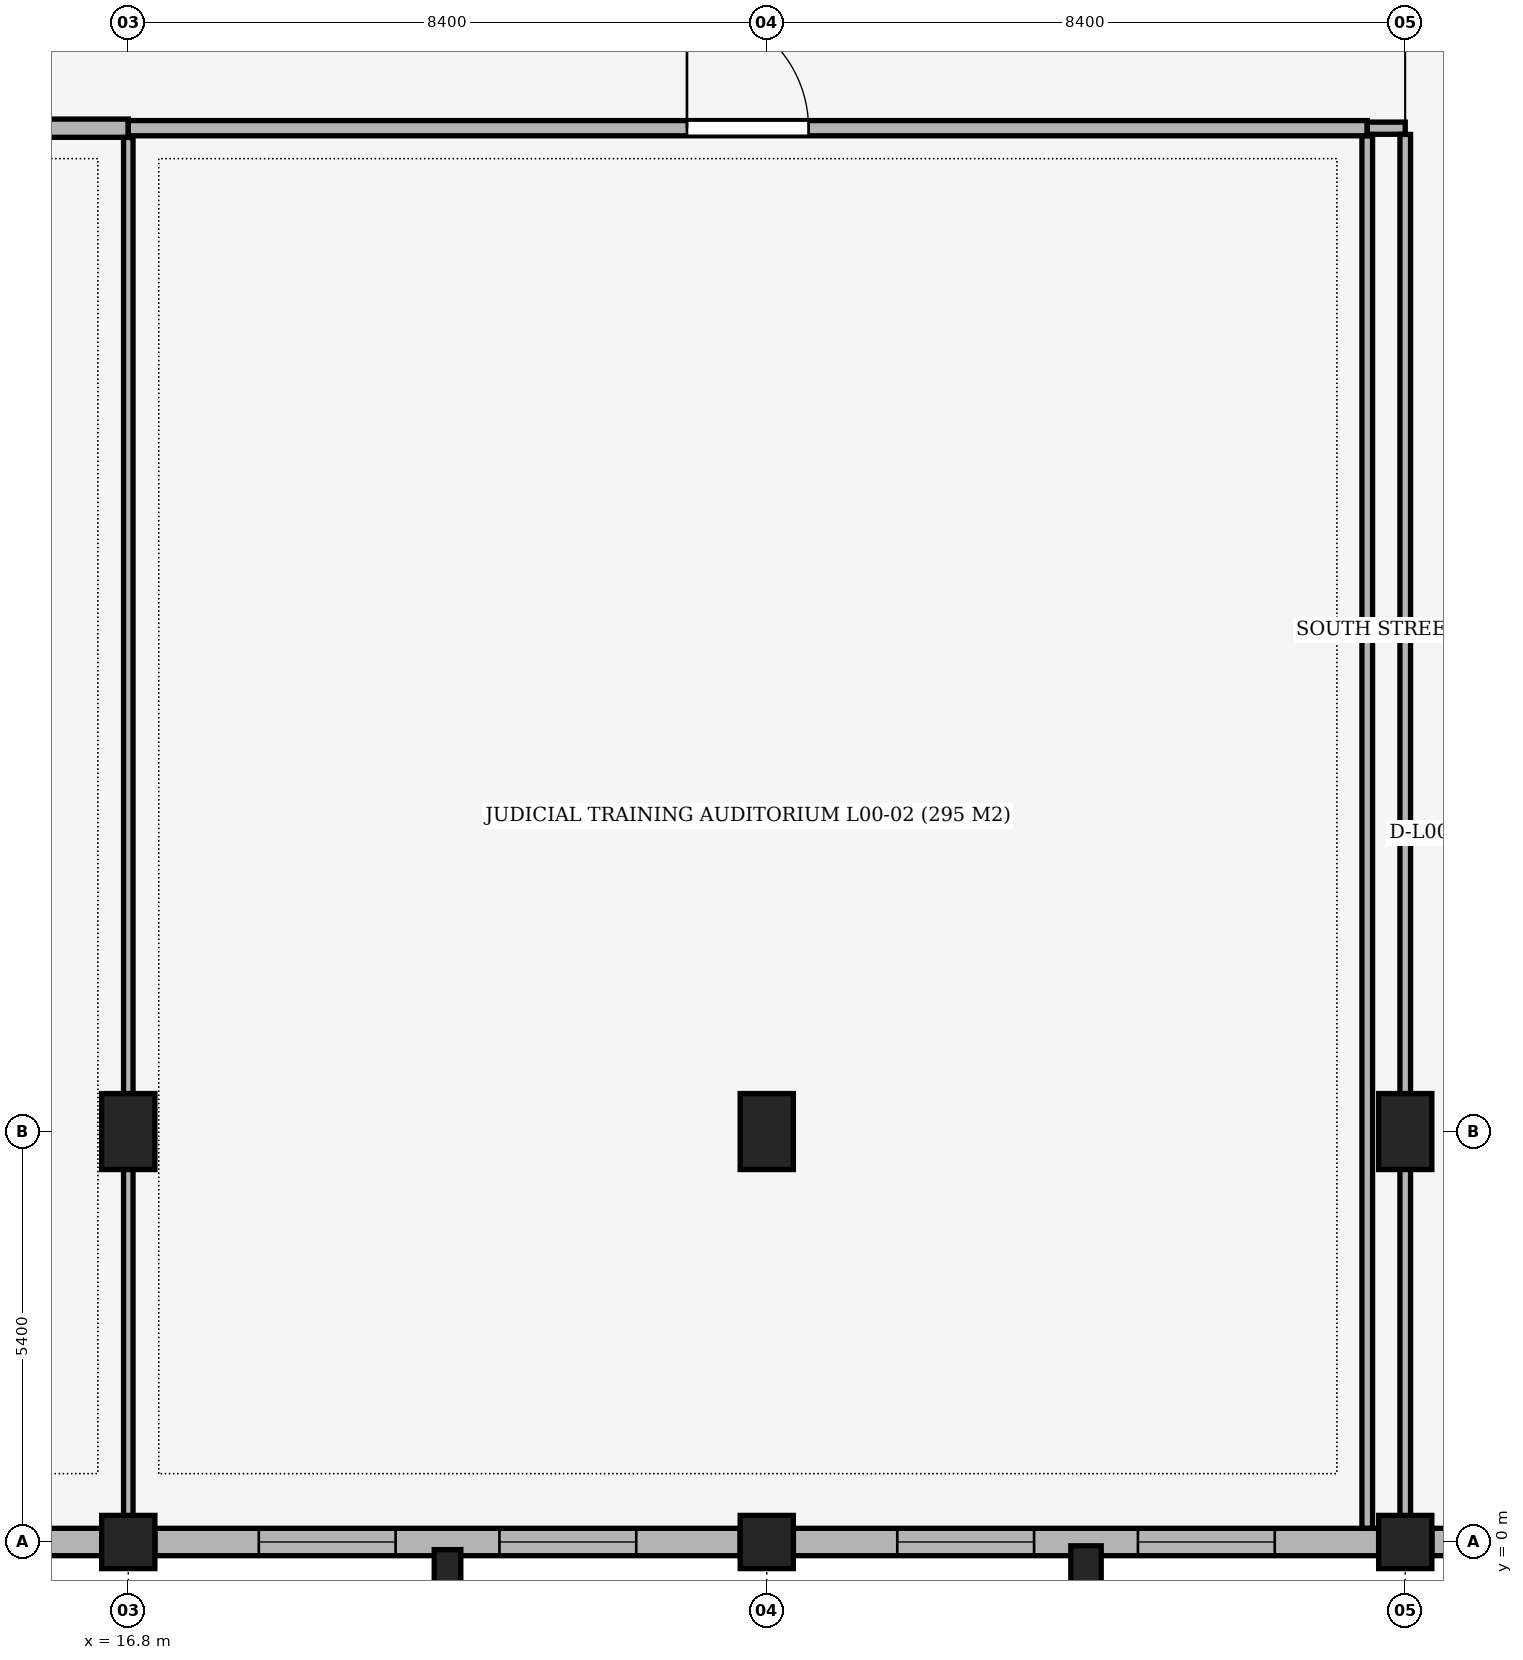
"""IFC4 building model, lengths in metres.
Left out: names, types, materials, properties, quantities, classifications, styles, units other than length and angle.
Written with IfcOpenShell. Run it as: python <this file> out.ifc"""

import sys

from ifc_helpers import new_model, si_unit, direction, frame, frame_2d, origin, origin_2d, place, context, subcontext, project, spatial, rectangle, extrude, element, fill, save


model = new_model("IFC4")
c1 = context("Model", 3, precision=1e-05, world=origin(), true_north=direction((0.0, 1.0)))
c2 = subcontext(c1, "Body", "Model", "MODEL_VIEW")
j1 = project(units=[si_unit("LENGTHUNIT", "METRE"), si_unit("PLANEANGLEUNIT", "RADIAN")], contexts=[c1])
p1 = place(None, origin())
s1 = spatial("IfcSite", under=j1, at=p1, CompositionType="ELEMENT")
p2 = place(p1, origin())
s2 = spatial("IfcBuilding", under=s1, at=p2, CompositionType="ELEMENT")
p3 = place(p2, origin())
s3 = spatial("IfcBuildingStorey", under=s2, at=p3, CompositionType="ELEMENT", Elevation=0.0)
p4 = place(p3, frame((16.8, 0.0, 0.0), z_axis=(0.0, 0.0, 1.0), x_axis=(1.0, 0.0, 0.0)))
e1 = element("IfcColumn", 1, at=p4, inside=s3, PredefinedType="COLUMN", context=c2, shape_type="SweptSolid", body=[
    extrude(rectangle(XDim=0.7, YDim=0.7, at=origin_2d()), origin(), (0.0, 0.0, 1.0), 5.1),
])
p5 = place(p3, frame((16.8, 5.4, 0.0), z_axis=(0.0, 0.0, 1.0), x_axis=(1.0, 0.0, 0.0)))
e2 = element("IfcColumn", 2, at=p5, inside=s3, PredefinedType="COLUMN", context=c2, shape_type="SweptSolid", body=[
    extrude(rectangle(XDim=0.7, YDim=1.0, at=origin_2d()), origin(), (0.0, 0.0, 1.0), 5.1),
])
p6 = place(p3, frame((25.2, 0.0, 0.0), z_axis=(0.0, 0.0, 1.0), x_axis=(1.0, 0.0, 0.0)))
e3 = element("IfcColumn", 3, at=p6, inside=s3, PredefinedType="COLUMN", context=c2, shape_type="SweptSolid", body=[
    extrude(rectangle(XDim=0.7, YDim=0.7, at=origin_2d()), origin(), (0.0, 0.0, 1.0), 5.1),
])
p7 = place(p3, frame((25.2, 5.4, 0.0), z_axis=(0.0, 0.0, 1.0), x_axis=(1.0, 0.0, 0.0)))
e4 = element("IfcColumn", 4, at=p7, inside=s3, PredefinedType="COLUMN", context=c2, shape_type="SweptSolid", body=[
    extrude(rectangle(XDim=0.7, YDim=1.0, at=origin_2d()), origin(), (0.0, 0.0, 1.0), 5.1),
])
p8 = place(p3, frame((33.6, 0.0, 0.0), z_axis=(0.0, 0.0, 1.0), x_axis=(1.0, 0.0, 0.0)))
e5 = element("IfcColumn", 5, at=p8, inside=s3, PredefinedType="COLUMN", context=c2, shape_type="SweptSolid", body=[
    extrude(rectangle(XDim=0.7, YDim=0.7, at=origin_2d()), origin(), (0.0, 0.0, 1.0), 5.1),
])
p9 = place(p3, frame((33.6, 5.4, 0.0), z_axis=(0.0, 0.0, 1.0), x_axis=(1.0, 0.0, 0.0)))
e6 = element("IfcColumn", 6, at=p9, inside=s3, PredefinedType="COLUMN", context=c2, shape_type="SweptSolid", body=[
    extrude(rectangle(XDim=0.7, YDim=1.0, at=origin_2d()), origin(), (0.0, 0.0, 1.0), 5.1),
])
p10 = place(p3, frame((21.0, -0.35, 0.0), z_axis=(0.0, 0.0, 1.0), x_axis=(1.0, 0.0, 0.0)))
e7 = element("IfcColumn", 7, at=p10, inside=s3, PredefinedType="PILASTER", context=c2, shape_type="SweptSolid", body=[
    extrude(rectangle(XDim=0.35, YDim=0.5, at=origin_2d()), origin(), (0.0, 0.0, 1.0), 5.1),
])
p11 = place(p3, frame((29.4, -0.35, 0.0), z_axis=(0.0, 0.0, 1.0), x_axis=(1.0, 0.0, 0.0)))
e8 = element("IfcColumn", 8, at=p11, inside=s3, PredefinedType="PILASTER", context=c2, shape_type="SweptSolid", body=[
    extrude(rectangle(XDim=0.4, YDim=0.6, at=origin_2d()), origin(), (0.0, 0.0, 1.0), 5.1),
])
p12 = place(p3, frame((41.65, 0.0, 0.0), z_axis=(0.0, 0.0, 1.0), x_axis=(-1.0, 0.0, 0.0)))
e9 = element("IfcWall", 9, at=p12, inside=s3, PredefinedType="SOLIDWALL", context=c2, shape_type="SweptSolid", body=[
    extrude(rectangle(XDim=7.7, YDim=0.36, at=frame_2d((3.85, 0.0))), origin(), (0.0, 0.0, 1.0), 4.07),
])
p13 = place(p12, frame((5.45, 0.0, 0.0)))
e10 = element("IfcOpeningElement", 10, at=p13, cuts=e9, PredefinedType="OPENING", context=c2, shape_type="SweptSolid", body=[
    extrude(rectangle(XDim=1.8, YDim=2.2, at=frame_2d((0.9, 1.1))), frame((0.0, 0.195, 0.0), z_axis=(0.0, -1.0, 0.0), x_axis=(1.0, 0.0, 0.0)), (0.0, 0.0, 1.0), 0.39),
])
p14 = place(p3, frame((33.25, 0.0, 0.0), z_axis=(0.0, 0.0, 1.0), x_axis=(-1.0, 0.0, 0.0)))
e11 = element("IfcWall", 11, at=p14, inside=s3, PredefinedType="SOLIDWALL", context=c2, shape_type="SweptSolid", body=[
    extrude(rectangle(XDim=7.7, YDim=0.36, at=frame_2d((3.85, 0.0))), origin(), (0.0, 0.0, 1.0), 4.07),
])
p15 = place(p14, frame((1.367, 0.0, 0.85)))
e12 = element("IfcOpeningElement", 12, at=p15, cuts=e11, PredefinedType="OPENING", context=c2, shape_type="SweptSolid", body=[
    extrude(rectangle(XDim=1.8, YDim=2.4, at=frame_2d((0.9, 1.2))), frame((0.0, 0.195, 0.0), z_axis=(0.0, -1.0, 0.0), x_axis=(1.0, 0.0, 0.0)), (0.0, 0.0, 1.0), 0.39),
])
p16 = place(p14, frame((4.533, 0.0, 0.85)))
e13 = element("IfcOpeningElement", 13, at=p16, cuts=e11, PredefinedType="OPENING", context=c2, shape_type="SweptSolid", body=[
    extrude(rectangle(XDim=1.8, YDim=2.4, at=frame_2d((0.9, 1.2))), frame((0.0, 0.195, 0.0), z_axis=(0.0, -1.0, 0.0), x_axis=(1.0, 0.0, 0.0)), (0.0, 0.0, 1.0), 0.39),
])
p17 = place(p3, frame((24.85, 0.0, 0.0), z_axis=(0.0, 0.0, 1.0), x_axis=(-1.0, 0.0, 0.0)))
e14 = element("IfcWall", 14, at=p17, inside=s3, PredefinedType="SOLIDWALL", context=c2, shape_type="SweptSolid", body=[
    extrude(rectangle(XDim=7.7, YDim=0.36, at=frame_2d((3.85, 0.0))), origin(), (0.0, 0.0, 1.0), 4.07),
])
p18 = place(p17, frame((1.367, 0.0, 0.85)))
e15 = element("IfcOpeningElement", 15, at=p18, cuts=e14, PredefinedType="OPENING", context=c2, shape_type="SweptSolid", body=[
    extrude(rectangle(XDim=1.8, YDim=2.4, at=frame_2d((0.9, 1.2))), frame((0.0, 0.195, 0.0), z_axis=(0.0, -1.0, 0.0), x_axis=(1.0, 0.0, 0.0)), (0.0, 0.0, 1.0), 0.39),
])
p19 = place(p17, frame((4.533, 0.0, 0.85)))
e16 = element("IfcOpeningElement", 16, at=p19, cuts=e14, PredefinedType="OPENING", context=c2, shape_type="SweptSolid", body=[
    extrude(rectangle(XDim=1.8, YDim=2.4, at=frame_2d((0.9, 1.2))), frame((0.0, 0.195, 0.0), z_axis=(0.0, -1.0, 0.0), x_axis=(1.0, 0.0, 0.0)), (0.0, 0.0, 1.0), 0.39),
])
p20 = place(p3, frame((16.45, 0.0, 0.0), z_axis=(0.0, 0.0, 1.0), x_axis=(-1.0, 0.0, 0.0)))
e17 = element("IfcWall", 17, at=p20, inside=s3, PredefinedType="SOLIDWALL", context=c2, shape_type="SweptSolid", body=[
    extrude(rectangle(XDim=7.7, YDim=0.36, at=frame_2d((3.85, 0.0))), origin(), (0.0, 0.0, 1.0), 4.07),
])
p21 = place(p20, frame((3.25, 0.0, 0.0)))
e18 = element("IfcOpeningElement", 18, at=p21, cuts=e17, PredefinedType="OPENING", context=c2, shape_type="SweptSolid", body=[
    extrude(rectangle(XDim=1.2, YDim=2.2, at=frame_2d((0.6, 1.1))), frame((0.0, 0.195, 0.0), z_axis=(0.0, -1.0, 0.0), x_axis=(1.0, 0.0, 0.0)), (0.0, 0.0, 1.0), 0.39),
])
p22 = place(p3, frame((0.182, 18.6, 0.0), z_axis=(0.0, 0.0, 1.0), x_axis=(1.0, 0.0, 0.0)))
e19 = element("IfcWall", 19, at=p22, inside=s3, PredefinedType="PARTITIONING", context=c2, shape_type="SweptSolid", body=[
    extrude(rectangle(XDim=16.618, YDim=0.24, at=frame_2d((8.309, 0.0))), origin(), (0.0, 0.0, 1.0), 3.67),
])
p23 = place(p22, frame((7.509, 0.0, 0.0)))
e20 = element("IfcOpeningElement", 20, at=p23, cuts=e19, PredefinedType="OPENING", context=c2, shape_type="SweptSolid", body=[
    extrude(rectangle(XDim=1.6, YDim=2.3, at=frame_2d((0.8, 1.15))), frame((0.0, 0.135, 0.0), z_axis=(0.0, -1.0, 0.0), x_axis=(1.0, 0.0, 0.0)), (0.0, 0.0, 1.0), 0.27),
])
p24 = place(p3, frame((16.8, 18.6, 0.0), z_axis=(0.0, 0.0, 1.0), x_axis=(1.0, 0.0, 0.0)))
e21 = element("IfcWall", 21, at=p24, inside=s3, PredefinedType="PARTITIONING", context=c2, shape_type="SweptSolid", body=[
    extrude(rectangle(XDim=16.3, YDim=0.2, at=frame_2d((8.15, 0.0))), origin(), (0.0, 0.0, 1.0), 3.67),
])
p25 = place(p24, frame((7.35, 0.0, 0.0)))
e22 = element("IfcOpeningElement", 22, at=p25, cuts=e21, PredefinedType="OPENING", context=c2, shape_type="SweptSolid", body=[
    extrude(rectangle(XDim=1.6, YDim=2.3, at=frame_2d((0.8, 1.15))), frame((0.0, 0.115, 0.0), z_axis=(0.0, -1.0, 0.0), x_axis=(1.0, 0.0, 0.0)), (0.0, 0.0, 1.0), 0.23),
])
p26 = place(p3, frame((33.1, 18.6, 0.0), z_axis=(0.0, 0.0, 1.0), x_axis=(1.0, 0.0, 0.0)))
e23 = element("IfcWall", 23, at=p26, inside=s3, PredefinedType="PARTITIONING", context=c2, shape_type="SweptSolid", body=[
    extrude(rectangle(XDim=0.5, YDim=0.16, at=frame_2d((0.25, 0.0))), origin(), (0.0, 0.0, 1.0), 3.67),
])
p27 = place(p3, frame((16.8, 0.065, 0.0), z_axis=(0.0, 0.0, 1.0), x_axis=(0.0, 1.0, 0.0)))
e24 = element("IfcWall", 24, at=p27, inside=s3, PredefinedType="PARTITIONING", context=c2, shape_type="SweptSolid", body=[
    extrude(rectangle(XDim=18.413, YDim=0.125, at=frame_2d((9.207, 0.0))), origin(), (0.0, 0.0, 1.0), 3.67),
])
p28 = place(p3, frame((33.1, 0.182, 0.0), z_axis=(0.0, 0.0, 1.0), x_axis=(0.0, 1.0, 0.0)))
e25 = element("IfcWall", 25, at=p28, inside=s3, PredefinedType="PARTITIONING", context=c2, shape_type="SweptSolid", body=[
    extrude(rectangle(XDim=18.316, YDim=0.14, at=frame_2d((9.158, 0.0))), origin(), (0.0, 0.0, 1.0), 4.07),
])
p29 = place(p3, frame((33.6, -0.028, 0.0), z_axis=(0.0, 0.0, 1.0), x_axis=(0.0, 1.0, 0.0)))
e26 = element("IfcWall", 26, at=p29, inside=s3, PredefinedType="PARTITIONING", context=c2, shape_type="SweptSolid", body=[
    extrude(rectangle(XDim=18.546, YDim=0.14, at=frame_2d((9.273, 0.0))), origin(), (0.0, 0.0, 1.0), 3.67),
])
p30 = place(p15, origin())
e27 = element("IfcWindow", 27, at=p30, inside=s3, PartitioningType="SINGLE_PANEL", PredefinedType="WINDOW", context=c2, shape_type="SweptSolid", body=[
    extrude(rectangle(XDim=1.8, YDim=2.4, at=frame_2d((0.9, 1.2))), frame((0.0, 0.03, 0.0), z_axis=(0.0, -1.0, 0.0), x_axis=(1.0, 0.0, 0.0)), (0.0, 0.0, 1.0), 0.06),
])
fill(e12, e27)
p31 = place(p16, origin())
e28 = element("IfcWindow", 28, at=p31, inside=s3, PartitioningType="SINGLE_PANEL", PredefinedType="WINDOW", context=c2, shape_type="SweptSolid", body=[
    extrude(rectangle(XDim=1.8, YDim=2.4, at=frame_2d((0.9, 1.2))), frame((0.0, 0.03, 0.0), z_axis=(0.0, -1.0, 0.0), x_axis=(1.0, 0.0, 0.0)), (0.0, 0.0, 1.0), 0.06),
])
fill(e13, e28)
p32 = place(p18, origin())
e29 = element("IfcWindow", 29, at=p32, inside=s3, PartitioningType="SINGLE_PANEL", PredefinedType="WINDOW", context=c2, shape_type="SweptSolid", body=[
    extrude(rectangle(XDim=1.8, YDim=2.4, at=frame_2d((0.9, 1.2))), frame((0.0, 0.03, 0.0), z_axis=(0.0, -1.0, 0.0), x_axis=(1.0, 0.0, 0.0)), (0.0, 0.0, 1.0), 0.06),
])
fill(e15, e29)
p33 = place(p19, origin())
e30 = element("IfcWindow", 30, at=p33, inside=s3, PartitioningType="SINGLE_PANEL", PredefinedType="WINDOW", context=c2, shape_type="SweptSolid", body=[
    extrude(rectangle(XDim=1.8, YDim=2.4, at=frame_2d((0.9, 1.2))), frame((0.0, 0.03, 0.0), z_axis=(0.0, -1.0, 0.0), x_axis=(1.0, 0.0, 0.0)), (0.0, 0.0, 1.0), 0.06),
])
fill(e16, e30)
p34 = place(p25, origin())
e31 = element("IfcDoor", 31, at=p34, inside=s3, OperationType="SINGLE_SWING_LEFT", PredefinedType="DOOR", context=c2, shape_type="SweptSolid", body=[
    extrude(rectangle(XDim=1.6, YDim=2.3, at=frame_2d((0.8, 1.15))), frame((0.0, 0.025, 0.0), z_axis=(0.0, -1.0, 0.0), x_axis=(1.0, 0.0, 0.0)), (0.0, 0.0, 1.0), 0.05),
])
fill(e22, e31)
save(model, sys.argv[1])
